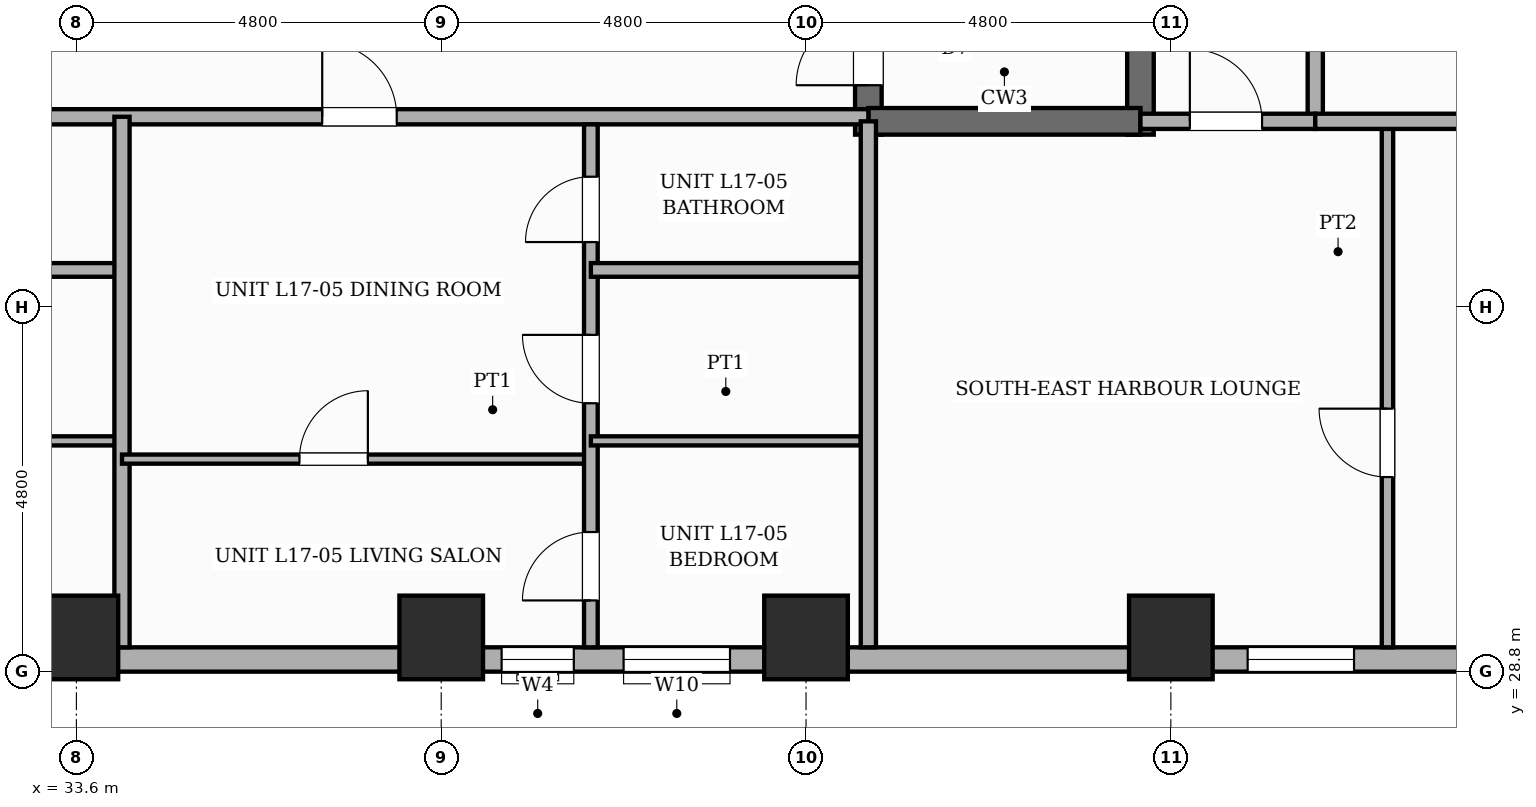
"""IFC4 building model, lengths in metres.
Left out: names, types, materials, properties, quantities, classifications, styles, units other than length and angle.
Written with IfcOpenShell. Run it as: python <this file> out.ifc"""

import sys

from ifc_helpers import new_model, si_unit, direction, frame, frame_2d, origin, origin_2d, place, context, subcontext, project, spatial, rectangle, extrude, element, fill, save


model = new_model("IFC4")
c1 = context("Model", 3, precision=1e-05, world=origin(), true_north=direction((0.0, 1.0)))
c2 = subcontext(c1, "Body", "Model", "MODEL_VIEW")
j1 = project(units=[si_unit("LENGTHUNIT", "METRE"), si_unit("PLANEANGLEUNIT", "RADIAN")], contexts=[c1])
p1 = place(None, origin())
s1 = spatial("IfcSite", under=j1, at=p1, CompositionType="ELEMENT")
p2 = place(p1, origin())
s2 = spatial("IfcBuilding", under=s1, at=p2, CompositionType="ELEMENT")
p3 = place(p2, frame((0.0, 0.0, 68.2)))
s3 = spatial("IfcBuildingStorey", under=s2, at=p3, CompositionType="ELEMENT", Elevation=68.2)
p4 = place(p3, frame((44.02, 35.865, 0.0), z_axis=(0.0, 0.0, 1.0), x_axis=(0.0, 1.0, 0.0)))
e1 = element("IfcWall", 1, at=p4, inside=s3, PredefinedType="SHEAR", context=c2, shape_type="SweptSolid", body=[
    extrude(rectangle(XDim=8.97, YDim=0.35, at=frame_2d((4.485, 0.0))), origin(), (0.0, 0.0, 1.0), 3.6),
])
p5 = place(p4, frame((0.65, 0.0, 0.0)))
e2 = element("IfcOpeningElement", 2, at=p5, cuts=e1, PredefinedType="OPENING", context=c2, shape_type="SweptSolid", body=[
    extrude(rectangle(XDim=0.95, YDim=2.1, at=frame_2d((0.475, 1.05))), frame((0.0, 0.185, 0.0), z_axis=(0.0, -1.0, 0.0), x_axis=(1.0, 0.0, 0.0)), (0.0, 0.0, 1.0), 0.37),
])
p6 = place(p3, frame((47.6, 35.865, 0.0), z_axis=(0.0, 0.0, 1.0), x_axis=(0.0, 1.0, 0.0)))
e3 = element("IfcWall", 3, at=p6, inside=s3, PredefinedType="SHEAR", context=c2, shape_type="SweptSolid", body=[
    extrude(rectangle(XDim=8.97, YDim=0.35, at=frame_2d((4.485, 0.0))), origin(), (0.0, 0.0, 1.0), 3.6),
])
p7 = place(p3, frame((44.02, 36.04, 0.0), z_axis=(0.0, 0.0, 1.0), x_axis=(1.0, 0.0, 0.0)))
e4 = element("IfcWall", 4, at=p7, inside=s3, PredefinedType="SHEAR", context=c2, shape_type="SweptSolid", body=[
    extrude(rectangle(XDim=3.58, YDim=0.35, at=frame_2d((1.79, 0.0))), origin(), (0.0, 0.0, 1.0), 3.6),
])
for number, where, z_axis, x_axis in (
    (5, (33.6, 29.25, 0.0), (0.0, 0.0, 1.0), (1.0, 0.0, 0.0)),
    (6, (38.4, 29.25, 0.0), (0.0, 0.0, 1.0), (1.0, 0.0, 0.0)),
    (7, (43.2, 29.25, 0.0), (0.0, 0.0, 1.0), (1.0, 0.0, 0.0)),
    (8, (48.0, 29.25, 0.0), (0.0, 0.0, 1.0), (1.0, 0.0, 0.0)),
):
    element("IfcColumn", number, at=place(p3, frame(where, z_axis=z_axis, x_axis=x_axis)), inside=s3, PredefinedType="COLUMN", context=c2, shape_type="SweptSolid", body=[
        extrude(rectangle(XDim=1.1, YDim=1.1, at=origin_2d()), origin(), (0.0, 0.0, 1.0), 3.6),
    ])
p8 = place(p3, frame((55.2, 28.96, 0.0), z_axis=(0.0, 0.0, 1.0), x_axis=(-1.0, 0.0, 0.0)))
e9 = element("IfcWall", 9, at=p8, inside=s3, PredefinedType="STANDARD", context=c2, shape_type="SweptSolid", body=[
    extrude(rectangle(XDim=28.8, YDim=0.32, at=frame_2d((14.4, 0.0))), origin(), (0.0, 0.0, 1.0), 2.53),
])
p9 = place(p8, frame((23.3, 0.0, 0.65)))
e10 = element("IfcOpeningElement", 10, at=p9, cuts=e9, PredefinedType="OPENING", context=c2, shape_type="SweptSolid", body=[
    extrude(rectangle(XDim=1.4, YDim=1.1, at=frame_2d((0.7, 0.55))), frame((0.0, 0.17, 0.0), z_axis=(0.0, -1.0, 0.0), x_axis=(1.0, 0.0, 0.0)), (0.0, 0.0, 1.0), 0.34),
])
p10 = place(p8, frame((13.0, 0.0, 0.65)))
e11 = element("IfcOpeningElement", 11, at=p10, cuts=e9, PredefinedType="OPENING", context=c2, shape_type="SweptSolid", body=[
    extrude(rectangle(XDim=1.4, YDim=1.1, at=frame_2d((0.7, 0.55))), frame((0.0, 0.17, 0.0), z_axis=(0.0, -1.0, 0.0), x_axis=(1.0, 0.0, 0.0)), (0.0, 0.0, 1.0), 0.34),
])
p11 = place(p8, frame((4.79, 0.0, 0.65)))
e12 = element("IfcOpeningElement", 12, at=p11, cuts=e9, PredefinedType="OPENING", context=c2, shape_type="SweptSolid", body=[
    extrude(rectangle(XDim=1.4, YDim=1.1, at=frame_2d((0.7, 0.55))), frame((0.0, 0.17, 0.0), z_axis=(0.0, -1.0, 0.0), x_axis=(1.0, 0.0, 0.0)), (0.0, 0.0, 1.0), 0.34),
])
p12 = place(p8, frame((0.47, 0.0, 0.65)))
e13 = element("IfcOpeningElement", 13, at=p12, cuts=e9, PredefinedType="OPENING", context=c2, shape_type="SweptSolid", body=[
    extrude(rectangle(XDim=1.4, YDim=1.1, at=frame_2d((0.7, 0.55))), frame((0.0, 0.17, 0.0), z_axis=(0.0, -1.0, 0.0), x_axis=(1.0, 0.0, 0.0)), (0.0, 0.0, 1.0), 0.34),
])
p13 = place(p8, frame((15.055, 0.0, 0.45)))
e14 = element("IfcOpeningElement", 14, at=p13, cuts=e9, PredefinedType="OPENING", context=c2, shape_type="SweptSolid", body=[
    extrude(rectangle(XDim=0.95, YDim=1.8, at=frame_2d((0.475, 0.9))), frame((0.0, 0.17, 0.0), z_axis=(0.0, -1.0, 0.0), x_axis=(1.0, 0.0, 0.0)), (0.0, 0.0, 1.0), 0.34),
])
p14 = place(p3, frame((22.75, 36.1, 0.0), z_axis=(0.0, 0.0, 1.0), x_axis=(1.0, 0.0, 0.0)))
e15 = element("IfcWall", 15, at=p14, inside=s3, PredefinedType="PARTITIONING", context=c2, shape_type="SweptSolid", body=[
    extrude(rectangle(XDim=21.27, YDim=0.2, at=frame_2d((10.635, 0.0))), origin(), (0.0, 0.0, 1.0), 3.35),
])
p15 = place(p14, frame((1.625, 0.0, 0.0)))
e16 = element("IfcOpeningElement", 16, at=p15, cuts=e15, PredefinedType="OPENING", context=c2, shape_type="SweptSolid", body=[
    extrude(rectangle(XDim=0.98, YDim=2.18, at=frame_2d((0.49, 1.09))), frame((0.0, 0.11, 0.0), z_axis=(0.0, -1.0, 0.0), x_axis=(1.0, 0.0, 0.0)), (0.0, 0.0, 1.0), 0.22),
])
p16 = place(p14, frame((14.084, 0.0, 0.0)))
e17 = element("IfcOpeningElement", 17, at=p16, cuts=e15, PredefinedType="OPENING", context=c2, shape_type="SweptSolid", body=[
    extrude(rectangle(XDim=0.98, YDim=2.18, at=frame_2d((0.49, 1.09))), frame((0.0, 0.11, 0.0), z_axis=(0.0, -1.0, 0.0), x_axis=(1.0, 0.0, 0.0)), (0.0, 0.0, 1.0), 0.22),
])
p17 = place(p3, frame((26.801, 31.836, 0.0), z_axis=(0.0, 0.0, 1.0), x_axis=(1.0, 0.0, 0.0)))
e18 = element("IfcWall", 18, at=p17, inside=s3, PredefinedType="PARTITIONING", context=c2, shape_type="SweptSolid", body=[
    extrude(rectangle(XDim=7.399, YDim=0.12, at=frame_2d((3.699, 0.0))), origin(), (0.0, 0.0, 1.0), 3.35),
])
p18 = place(p3, frame((26.801, 34.085, 0.0), z_axis=(0.0, 0.0, 1.0), x_axis=(1.0, 0.0, 0.0)))
e19 = element("IfcWall", 19, at=p18, inside=s3, PredefinedType="PLUMBINGWALL", context=c2, shape_type="SweptSolid", body=[
    extrude(rectangle(XDim=7.399, YDim=0.18, at=frame_2d((3.699, 0.0))), origin(), (0.0, 0.0, 1.0), 3.35),
])
p19 = place(p3, frame((34.2, 29.12, 0.0), z_axis=(0.0, 0.0, 1.0), x_axis=(0.0, 1.0, 0.0)))
e20 = element("IfcWall", 20, at=p19, inside=s3, PredefinedType="SOLIDWALL", context=c2, shape_type="SweptSolid", body=[
    extrude(rectangle(XDim=6.98, YDim=0.2, at=frame_2d((3.49, 0.0))), origin(), (0.0, 0.0, 1.0), 3.35),
])
p20 = place(p3, frame((34.2, 31.596, 0.0), z_axis=(0.0, 0.0, 1.0), x_axis=(1.0, 0.0, 0.0)))
e21 = element("IfcWall", 21, at=p20, inside=s3, PredefinedType="PARTITIONING", context=c2, shape_type="SweptSolid", body=[
    extrude(rectangle(XDim=6.169, YDim=0.12, at=frame_2d((3.084, 0.0))), origin(), (0.0, 0.0, 1.0), 3.35),
])
p21 = place(p20, frame((2.335, 0.0, 0.0)))
e22 = element("IfcOpeningElement", 22, at=p21, cuts=e21, PredefinedType="OPENING", context=c2, shape_type="SweptSolid", body=[
    extrude(rectangle(XDim=0.9, YDim=2.15, at=frame_2d((0.45, 1.075))), frame((0.0, 0.07, 0.0), z_axis=(0.0, -1.0, 0.0), x_axis=(1.0, 0.0, 0.0)), (0.0, 0.0, 1.0), 0.14),
])
p22 = place(p3, frame((40.369, 29.12, 0.0), z_axis=(0.0, 0.0, 1.0), x_axis=(0.0, 1.0, 0.0)))
e23 = element("IfcWall", 23, at=p22, inside=s3, PredefinedType="PLUMBINGWALL", context=c2, shape_type="SweptSolid", body=[
    extrude(rectangle(XDim=6.88, YDim=0.18, at=frame_2d((3.44, 0.0))), origin(), (0.0, 0.0, 1.0), 3.35),
])
p23 = place(p22, frame((0.617, 0.0, 0.0)))
e24 = element("IfcOpeningElement", 24, at=p23, cuts=e23, PredefinedType="OPENING", context=c2, shape_type="SweptSolid", body=[
    extrude(rectangle(XDim=0.9, YDim=2.15, at=frame_2d((0.45, 1.075))), frame((0.0, 0.1, 0.0), z_axis=(0.0, -1.0, 0.0), x_axis=(1.0, 0.0, 0.0)), (0.0, 0.0, 1.0), 0.2),
])
p24 = place(p22, frame((3.21, 0.0, 0.0)))
e25 = element("IfcOpeningElement", 25, at=p24, cuts=e23, PredefinedType="OPENING", context=c2, shape_type="SweptSolid", body=[
    extrude(rectangle(XDim=0.9, YDim=2.15, at=frame_2d((0.45, 1.075))), frame((0.0, 0.1, 0.0), z_axis=(0.0, -1.0, 0.0), x_axis=(1.0, 0.0, 0.0)), (0.0, 0.0, 1.0), 0.2),
])
p25 = place(p22, frame((5.332, 0.0, 0.0)))
e26 = element("IfcOpeningElement", 26, at=p25, cuts=e23, PredefinedType="OPENING", context=c2, shape_type="SweptSolid", body=[
    extrude(rectangle(XDim=0.86, YDim=2.1, at=frame_2d((0.43, 1.05))), frame((0.0, 0.1, 0.0), z_axis=(0.0, -1.0, 0.0), x_axis=(1.0, 0.0, 0.0)), (0.0, 0.0, 1.0), 0.2),
])
p26 = place(p3, frame((40.369, 31.836, 0.0), z_axis=(0.0, 0.0, 1.0), x_axis=(1.0, 0.0, 0.0)))
e27 = element("IfcWall", 27, at=p26, inside=s3, PredefinedType="PARTITIONING", context=c2, shape_type="SweptSolid", body=[
    extrude(rectangle(XDim=3.551, YDim=0.12, at=frame_2d((1.775, 0.0))), origin(), (0.0, 0.0, 1.0), 3.35),
])
p27 = place(p3, frame((40.369, 34.085, 0.0), z_axis=(0.0, 0.0, 1.0), x_axis=(1.0, 0.0, 0.0)))
e28 = element("IfcWall", 28, at=p27, inside=s3, PredefinedType="PLUMBINGWALL", context=c2, shape_type="SweptSolid", body=[
    extrude(rectangle(XDim=3.551, YDim=0.18, at=frame_2d((1.775, 0.0))), origin(), (0.0, 0.0, 1.0), 3.35),
])
p28 = place(p3, frame((49.9, 36.04, 0.0), z_axis=(0.0, 0.0, 1.0), x_axis=(0.0, 1.0, 0.0)))
e29 = element("IfcWall", 29, at=p28, inside=s3, PredefinedType="PARTITIONING", context=c2, shape_type="SweptSolid", body=[
    extrude(rectangle(XDim=11.64, YDim=0.2, at=frame_2d((5.82, 0.0))), origin(), (0.0, 0.0, 1.0), 3.35),
])
p29 = place(p28, frame((6.251, 0.0, 0.0)))
e30 = element("IfcOpeningElement", 30, at=p29, cuts=e29, PredefinedType="OPENING", context=c2, shape_type="SweptSolid", body=[
    extrude(rectangle(XDim=0.98, YDim=2.18, at=frame_2d((0.49, 1.09))), frame((0.0, 0.11, 0.0), z_axis=(0.0, -1.0, 0.0), x_axis=(1.0, 0.0, 0.0)), (0.0, 0.0, 1.0), 0.22),
])
p30 = place(p3, frame((47.6, 36.04, 0.0), z_axis=(0.0, 0.0, 1.0), x_axis=(1.0, 0.0, 0.0)))
e31 = element("IfcWall", 31, at=p30, inside=s3, PredefinedType="PARTITIONING", context=c2, shape_type="SweptSolid", body=[
    extrude(rectangle(XDim=2.3, YDim=0.2, at=frame_2d((1.15, 0.0))), origin(), (0.0, 0.0, 1.0), 3.35),
])
p31 = place(p30, frame((0.65, 0.0, 0.0)))
e32 = element("IfcOpeningElement", 32, at=p31, cuts=e31, PredefinedType="OPENING", context=c2, shape_type="SweptSolid", body=[
    extrude(rectangle(XDim=0.95, YDim=2.15, at=frame_2d((0.475, 1.075))), frame((0.0, 0.11, 0.0), z_axis=(0.0, -1.0, 0.0), x_axis=(1.0, 0.0, 0.0)), (0.0, 0.0, 1.0), 0.22),
])
p32 = place(p3, frame((44.02, 29.12, 0.0), z_axis=(0.0, 0.0, 1.0), x_axis=(0.0, 1.0, 0.0)))
e33 = element("IfcWall", 33, at=p32, inside=s3, PredefinedType="SOLIDWALL", context=c2, shape_type="SweptSolid", body=[
    extrude(rectangle(XDim=6.92, YDim=0.2, at=frame_2d((3.46, 0.0))), origin(), (0.0, 0.0, 1.0), 3.35),
])
p33 = place(p3, frame((50.85, 29.12, 0.0), z_axis=(0.0, 0.0, 1.0), x_axis=(0.0, 1.0, 0.0)))
e34 = element("IfcWall", 34, at=p33, inside=s3, PredefinedType="PARTITIONING", context=c2, shape_type="SweptSolid", body=[
    extrude(rectangle(XDim=6.92, YDim=0.15, at=frame_2d((3.46, 0.0))), origin(), (0.0, 0.0, 1.0), 3.35),
])
p34 = place(p33, frame((2.24, 0.0, 0.0)))
e35 = element("IfcOpeningElement", 35, at=p34, cuts=e34, PredefinedType="OPENING", context=c2, shape_type="SweptSolid", body=[
    extrude(rectangle(XDim=0.9, YDim=2.15, at=frame_2d((0.45, 1.075))), frame((0.0, 0.085, 0.0), z_axis=(0.0, -1.0, 0.0), x_axis=(1.0, 0.0, 0.0)), (0.0, 0.0, 1.0), 0.17),
])
p35 = place(p3, frame((49.9, 36.04, 0.0), z_axis=(0.0, 0.0, 1.0), x_axis=(1.0, 0.0, 0.0)))
e36 = element("IfcWall", 36, at=p35, inside=s3, PredefinedType="SOLIDWALL", context=c2, shape_type="SweptSolid", body=[
    extrude(rectangle(XDim=7.38, YDim=0.2, at=frame_2d((3.69, 0.0))), origin(), (0.0, 0.0, 1.0), 3.35),
])
p36 = place(p10, origin())
e37 = element("IfcWindow", 37, at=p36, inside=s3, PartitioningType="SINGLE_PANEL", PredefinedType="WINDOW", context=c2, shape_type="SweptSolid", body=[
    extrude(rectangle(XDim=1.4, YDim=1.1, at=frame_2d((0.7, 0.55))), frame((0.0, 0.03, 0.0), z_axis=(0.0, -1.0, 0.0), x_axis=(1.0, 0.0, 0.0)), (0.0, 0.0, 1.0), 0.06),
])
fill(e11, e37)
p37 = place(p11, origin())
e38 = element("IfcWindow", 38, at=p37, inside=s3, PartitioningType="SINGLE_PANEL", PredefinedType="WINDOW", context=c2, shape_type="SweptSolid", body=[
    extrude(rectangle(XDim=1.4, YDim=1.1, at=frame_2d((0.7, 0.55))), frame((0.0, 0.03, 0.0), z_axis=(0.0, -1.0, 0.0), x_axis=(1.0, 0.0, 0.0)), (0.0, 0.0, 1.0), 0.06),
])
fill(e12, e38)
p38 = place(p13, origin())
e39 = element("IfcWindow", 39, at=p38, inside=s3, PartitioningType="SINGLE_PANEL", PredefinedType="WINDOW", context=c2, shape_type="SweptSolid", body=[
    extrude(rectangle(XDim=0.95, YDim=1.8, at=frame_2d((0.475, 0.9))), frame((0.0, 0.03, 0.0), z_axis=(0.0, -1.0, 0.0), x_axis=(1.0, 0.0, 0.0)), (0.0, 0.0, 1.0), 0.06),
])
fill(e14, e39)
p39 = place(p5, origin())
e40 = element("IfcDoor", 40, at=p39, inside=s3, OperationType="SINGLE_SWING_LEFT", PredefinedType="DOOR", context=c2, shape_type="SweptSolid", body=[
    extrude(rectangle(XDim=0.95, YDim=2.1, at=frame_2d((0.475, 1.05))), frame((0.0, 0.025, 0.0), z_axis=(0.0, -1.0, 0.0), x_axis=(1.0, 0.0, 0.0)), (0.0, 0.0, 1.0), 0.05),
])
fill(e2, e40)
p40 = place(p16, origin())
e41 = element("IfcDoor", 41, at=p40, inside=s3, OperationType="SINGLE_SWING_LEFT", PredefinedType="DOOR", context=c2, shape_type="SweptSolid", body=[
    extrude(rectangle(XDim=0.98, YDim=2.18, at=frame_2d((0.49, 1.09))), frame((0.0, 0.025, 0.0), z_axis=(0.0, -1.0, 0.0), x_axis=(1.0, 0.0, 0.0)), (0.0, 0.0, 1.0), 0.05),
])
fill(e17, e41)
p41 = place(p21, origin())
e42 = element("IfcDoor", 42, at=p41, inside=s3, OperationType="SINGLE_SWING_RIGHT", PredefinedType="DOOR", context=c2, shape_type="SweptSolid", body=[
    extrude(rectangle(XDim=0.9, YDim=2.15, at=frame_2d((0.45, 1.075))), frame((0.0, 0.025, 0.0), z_axis=(0.0, -1.0, 0.0), x_axis=(1.0, 0.0, 0.0)), (0.0, 0.0, 1.0), 0.05),
])
fill(e22, e42)
p42 = place(p23, origin())
e43 = element("IfcDoor", 43, at=p42, inside=s3, OperationType="SINGLE_SWING_LEFT", PredefinedType="DOOR", context=c2, shape_type="SweptSolid", body=[
    extrude(rectangle(XDim=0.9, YDim=2.15, at=frame_2d((0.45, 1.075))), frame((0.0, 0.025, 0.0), z_axis=(0.0, -1.0, 0.0), x_axis=(1.0, 0.0, 0.0)), (0.0, 0.0, 1.0), 0.05),
])
fill(e24, e43)
p43 = place(p24, origin())
e44 = element("IfcDoor", 44, at=p43, inside=s3, OperationType="SINGLE_SWING_RIGHT", PredefinedType="DOOR", context=c2, shape_type="SweptSolid", body=[
    extrude(rectangle(XDim=0.9, YDim=2.15, at=frame_2d((0.45, 1.075))), frame((0.0, 0.025, 0.0), z_axis=(0.0, -1.0, 0.0), x_axis=(1.0, 0.0, 0.0)), (0.0, 0.0, 1.0), 0.05),
])
fill(e25, e44)
p44 = place(p25, origin())
e45 = element("IfcDoor", 45, at=p44, inside=s3, OperationType="SINGLE_SWING_LEFT", PredefinedType="DOOR", context=c2, shape_type="SweptSolid", body=[
    extrude(rectangle(XDim=0.86, YDim=2.1, at=frame_2d((0.43, 1.05))), frame((0.0, 0.025, 0.0), z_axis=(0.0, -1.0, 0.0), x_axis=(1.0, 0.0, 0.0)), (0.0, 0.0, 1.0), 0.05),
])
fill(e26, e45)
p45 = place(p31, origin())
e46 = element("IfcDoor", 46, at=p45, inside=s3, OperationType="SINGLE_SWING_LEFT", PredefinedType="DOOR", context=c2, shape_type="SweptSolid", body=[
    extrude(rectangle(XDim=0.95, YDim=2.15, at=frame_2d((0.475, 1.075))), frame((0.0, 0.025, 0.0), z_axis=(0.0, -1.0, 0.0), x_axis=(1.0, 0.0, 0.0)), (0.0, 0.0, 1.0), 0.05),
])
fill(e32, e46)
p46 = place(p34, origin())
e47 = element("IfcDoor", 47, at=p46, inside=s3, OperationType="SINGLE_SWING_RIGHT", PredefinedType="DOOR", context=c2, shape_type="SweptSolid", body=[
    extrude(rectangle(XDim=0.9, YDim=2.15, at=frame_2d((0.45, 1.075))), frame((0.0, 0.025, 0.0), z_axis=(0.0, -1.0, 0.0), x_axis=(1.0, 0.0, 0.0)), (0.0, 0.0, 1.0), 0.05),
])
fill(e35, e47)
save(model, sys.argv[1])
